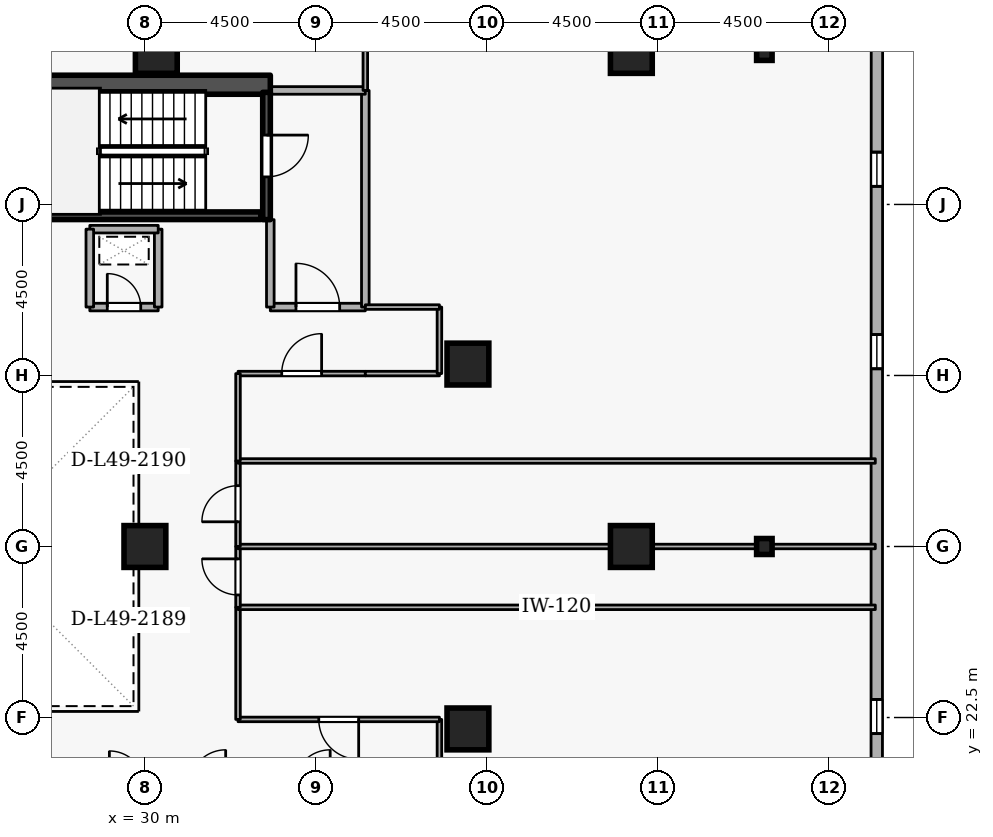
"""IFC4 building model, lengths in metres.
Left out: names, types, materials, properties, quantities, classifications, styles, units other than length and angle.
Written with IfcOpenShell. Run it as: python <this file> out.ifc"""

import sys

from ifc_helpers import new_model, si_unit, direction, frame, frame_2d, origin, origin_2d, place, context, subcontext, project, spatial, rectangle, i_section, extrude, element, fill, save


model = new_model("IFC4")
c1 = context("Model", 3, precision=1e-05, world=origin(), true_north=direction((0.0, 1.0)))
c2 = subcontext(c1, "Body", "Model", "MODEL_VIEW")
j1 = project(units=[si_unit("LENGTHUNIT", "METRE"), si_unit("PLANEANGLEUNIT", "RADIAN")], contexts=[c1])
p1 = place(None, origin())
s1 = spatial("IfcSite", under=j1, at=p1, CompositionType="ELEMENT")
p2 = place(p1, origin())
s2 = spatial("IfcBuilding", under=s1, at=p2, CompositionType="ELEMENT")
p3 = place(p2, frame((0.0, 0.0, 185.7)))
s3 = spatial("IfcBuildingStorey", under=s2, at=p3, CompositionType="ELEMENT", Elevation=185.7)
p4 = place(p3, frame((17.7, 39.15, 0.0), z_axis=(0.0, 0.0, 1.0), x_axis=(1.0, 0.0, 0.0)))
e1 = element("IfcWall", 1, at=p4, inside=s3, PredefinedType="SHEAR", context=c2, shape_type="SweptSolid", body=[
    extrude(rectangle(XDim=15.6, YDim=0.5, at=frame_2d((7.8, 0.0))), origin(), (0.0, 0.0, 1.0), 3.6),
])
for number, where, z_axis, x_axis in (
    (2, (42.8, 27.0, 0.0), (0.0, 0.0, 1.0), (1.0, 0.0, 0.0)),
    (3, (42.8, 40.0, 0.0), (0.0, 0.0, 1.0), (1.0, 0.0, 0.0)),
    (4, (38.5, 22.2, 0.0), (0.0, 0.0, 1.0), (1.0, 0.0, 0.0)),
    (5, (38.5, 31.8, 0.0), (0.0, 0.0, 1.0), (1.0, 0.0, 0.0)),
    (6, (30.3, 40.0, 0.0), (0.0, 0.0, 1.0), (1.0, 0.0, 0.0)),
    (7, (30.0, 27.0, 0.0), (0.0, 0.0, 1.0), (1.0, 0.0, 0.0)),
):
    element("IfcColumn", number, at=place(p3, frame(where, z_axis=z_axis, x_axis=x_axis)), inside=s3, PredefinedType="COLUMN", context=c2, shape_type="SweptSolid", body=[
        extrude(rectangle(XDim=1.1, YDim=1.1, at=origin_2d()), origin(), (0.0, 0.0, 1.0), 3.6),
    ])
for number, where, z_axis, x_axis in (
    (8, (46.3, 27.0, 0.0), (0.0, 0.0, 1.0), (1.0, 0.0, 0.0)),
    (9, (46.3, 40.0, 0.0), (0.0, 0.0, 1.0), (1.0, 0.0, 0.0)),
):
    element("IfcColumn", number, at=place(p3, frame(where, z_axis=z_axis, x_axis=x_axis)), inside=s3, PredefinedType="COLUMN", context=c2, shape_type="SweptSolid", body=[
        extrude(i_section(OverallWidth=0.407, OverallDepth=0.419, WebThickness=0.031, FlangeThickness=0.049, FilletRadius=0.015, at=origin_2d()), origin(), (0.0, 0.0, 1.0), 3.6),
    ])
p5 = place(p3, frame((49.256, 14.576, 0.0), z_axis=(0.0, 0.0, 1.0), x_axis=(0.000268805477, 0.999999963872, 0.0)))
e10 = element("IfcWall", 10, at=p5, inside=s3, PredefinedType="STANDARD", context=c2, shape_type="SweptSolid", body=[
    extrude(rectangle(XDim=33.605, YDim=0.3, at=frame_2d((16.802, 0.0))), origin(), (0.0, 0.0, 1.0), 2.7),
])
p6 = place(p5, frame((2.7, 0.0, 0.72)))
e11 = element("IfcOpeningElement", 11, at=p6, cuts=e10, PredefinedType="OPENING", context=c2, shape_type="SweptSolid", body=[
    extrude(rectangle(XDim=0.9, YDim=1.75, at=frame_2d((0.45, 0.875))), frame((0.0, 0.16, 0.0), z_axis=(0.0, -1.0, 0.0), x_axis=(1.0, 0.0, 0.0)), (0.0, 0.0, 1.0), 0.32),
])
p7 = place(p5, frame((7.5, 0.0, 0.72)))
e12 = element("IfcOpeningElement", 12, at=p7, cuts=e10, PredefinedType="OPENING", context=c2, shape_type="SweptSolid", body=[
    extrude(rectangle(XDim=0.9, YDim=1.75, at=frame_2d((0.45, 0.875))), frame((0.0, 0.16, 0.0), z_axis=(0.0, -1.0, 0.0), x_axis=(1.0, 0.0, 0.0)), (0.0, 0.0, 1.0), 0.32),
])
p8 = place(p5, frame((17.1, 0.0, 0.72)))
e13 = element("IfcOpeningElement", 13, at=p8, cuts=e10, PredefinedType="OPENING", context=c2, shape_type="SweptSolid", body=[
    extrude(rectangle(XDim=0.9, YDim=1.75, at=frame_2d((0.45, 0.875))), frame((0.0, 0.16, 0.0), z_axis=(0.0, -1.0, 0.0), x_axis=(1.0, 0.0, 0.0)), (0.0, 0.0, 1.0), 0.32),
])
p9 = place(p5, frame((21.9, 0.0, 0.72)))
e14 = element("IfcOpeningElement", 14, at=p9, cuts=e10, PredefinedType="OPENING", context=c2, shape_type="SweptSolid", body=[
    extrude(rectangle(XDim=0.9, YDim=1.75, at=frame_2d((0.45, 0.875))), frame((0.0, 0.16, 0.0), z_axis=(0.0, -1.0, 0.0), x_axis=(1.0, 0.0, 0.0)), (0.0, 0.0, 1.0), 0.32),
])
p10 = place(p5, frame((26.7, 0.0, 0.72)))
e15 = element("IfcOpeningElement", 15, at=p10, cuts=e10, PredefinedType="OPENING", context=c2, shape_type="SweptSolid", body=[
    extrude(rectangle(XDim=0.9, YDim=1.75, at=frame_2d((0.45, 0.875))), frame((0.0, 0.16, 0.0), z_axis=(0.0, -1.0, 0.0), x_axis=(1.0, 0.0, 0.0)), (0.0, 0.0, 1.0), 0.32),
])
p11 = place(p3, frame((33.2, 38.95, 0.0), z_axis=(0.0, 0.0, 1.0), x_axis=(0.0, -1.0, 0.0)))
e16 = element("IfcWall", 16, at=p11, inside=s3, PredefinedType="SHEAR", context=c2, shape_type="SweptSolid", body=[
    extrude(rectangle(XDim=3.35, YDim=0.2, at=frame_2d((1.675, 0.0))), origin(), (0.0, 0.0, 1.0), 3.6),
])
p12 = place(p11, frame((1.125, 0.0, 0.0)))
e17 = element("IfcOpeningElement", 17, at=p12, cuts=e16, PredefinedType="OPENING", context=c2, shape_type="SweptSolid", body=[
    extrude(rectangle(XDim=1.1, YDim=2.1, at=frame_2d((0.55, 1.05))), frame((0.0, 0.11, 0.0), z_axis=(0.0, -1.0, 0.0), x_axis=(1.0, 0.0, 0.0)), (0.0, 0.0, 1.0), 0.22),
])
p13 = place(p3, frame((25.95, 35.703, 0.0), z_axis=(0.0, 0.0, 1.0), x_axis=(1.0, 0.0, 0.0)))
e18 = element("IfcWall", 18, at=p13, inside=s3, PredefinedType="SHEAR", context=c2, shape_type="SweptSolid", body=[
    extrude(rectangle(XDim=7.1, YDim=0.2, at=frame_2d((3.55, 0.0))), origin(), (0.0, 0.0, 1.0), 3.6),
])
p14 = place(p3, frame((33.3, 33.3, 0.0), z_axis=(0.0, 0.0, 1.0), x_axis=(1.0, 0.0, 0.0)))
e19 = element("IfcWall", 19, at=p14, inside=s3, PredefinedType="STANDARD", context=c2, shape_type="SweptSolid", body=[
    extrude(rectangle(XDim=2.5, YDim=0.2, at=frame_2d((1.25, 0.0))), origin(), (0.0, 0.0, 1.0), 3.34),
])
p15 = place(p14, frame((0.675, 0.0, 0.0)))
e20 = element("IfcOpeningElement", 20, at=p15, cuts=e19, PredefinedType="OPENING", context=c2, shape_type="SweptSolid", body=[
    extrude(rectangle(XDim=1.15, YDim=2.1, at=frame_2d((0.575, 1.05))), frame((0.0, 0.11, 0.0), z_axis=(0.0, -1.0, 0.0), x_axis=(1.0, 0.0, 0.0)), (0.0, 0.0, 1.0), 0.22),
])
p16 = place(p3, frame((35.8, 33.3, 0.0), z_axis=(0.0, 0.0, 1.0), x_axis=(0.0, 1.0, 0.0)))
e21 = element("IfcWall", 21, at=p16, inside=s3, PredefinedType="STANDARD", context=c2, shape_type="SweptSolid", body=[
    extrude(rectangle(XDim=5.7, YDim=0.2, at=frame_2d((2.85, 0.0))), origin(), (0.0, 0.0, 1.0), 3.34),
])
p17 = place(p3, frame((35.8, 39.0, 0.0), z_axis=(0.0, 0.0, 1.0), x_axis=(-1.0, 0.0, 0.0)))
e22 = element("IfcWall", 22, at=p17, inside=s3, PredefinedType="STANDARD", context=c2, shape_type="SweptSolid", body=[
    extrude(rectangle(XDim=2.5, YDim=0.2, at=frame_2d((1.25, 0.0))), origin(), (0.0, 0.0, 1.0), 3.34),
])
p18 = place(p3, frame((33.3, 35.6, 0.0), z_axis=(0.0, 0.0, 1.0), x_axis=(0.0, -1.0, 0.0)))
e23 = element("IfcWall", 23, at=p18, inside=s3, PredefinedType="STANDARD", context=c2, shape_type="SweptSolid", body=[
    extrude(rectangle(XDim=2.3, YDim=0.2, at=frame_2d((1.15, 0.0))), origin(), (0.0, 0.0, 1.0), 2.545),
])
p19 = place(p3, frame((28.55, 33.3, 0.0), z_axis=(0.0, 0.0, 1.0), x_axis=(1.0, 0.0, 0.0)))
e24 = element("IfcWall", 24, at=p19, inside=s3, PredefinedType="STANDARD", context=c2, shape_type="SweptSolid", body=[
    extrude(rectangle(XDim=1.8, YDim=0.2, at=frame_2d((0.9, 0.0))), origin(), (0.0, 0.0, 1.0), 3.34),
])
p20 = place(p19, frame((0.46, 0.0, 0.0)))
e25 = element("IfcOpeningElement", 25, at=p20, cuts=e24, PredefinedType="OPENING", context=c2, shape_type="SweptSolid", body=[
    extrude(rectangle(XDim=0.88, YDim=2.04, at=frame_2d((0.44, 1.02))), frame((0.0, 0.11, 0.0), z_axis=(0.0, -1.0, 0.0), x_axis=(1.0, 0.0, 0.0)), (0.0, 0.0, 1.0), 0.22),
])
p21 = place(p3, frame((30.35, 33.3, 0.0), z_axis=(0.0, 0.0, 1.0), x_axis=(0.0, 1.0, 0.0)))
e26 = element("IfcWall", 26, at=p21, inside=s3, PredefinedType="STANDARD", context=c2, shape_type="SweptSolid", body=[
    extrude(rectangle(XDim=2.05, YDim=0.2, at=frame_2d((1.025, 0.0))), origin(), (0.0, 0.0, 1.0), 3.34),
])
p22 = place(p3, frame((30.35, 35.35, 0.0), z_axis=(0.0, 0.0, 1.0), x_axis=(-1.0, 0.0, 0.0)))
e27 = element("IfcWall", 27, at=p22, inside=s3, PredefinedType="STANDARD", context=c2, shape_type="SweptSolid", body=[
    extrude(rectangle(XDim=1.8, YDim=0.2, at=frame_2d((0.9, 0.0))), origin(), (0.0, 0.0, 1.0), 3.34),
])
p23 = place(p3, frame((28.55, 35.35, 0.0), z_axis=(0.0, 0.0, 1.0), x_axis=(0.0, -1.0, 0.0)))
e28 = element("IfcWall", 28, at=p23, inside=s3, PredefinedType="STANDARD", context=c2, shape_type="SweptSolid", body=[
    extrude(rectangle(XDim=2.05, YDim=0.2, at=frame_2d((1.025, 0.0))), origin(), (0.0, 0.0, 1.0), 3.34),
])
p24 = place(p3, frame((37.75, 20.7, 0.0), z_axis=(0.0, 0.0, 1.0), x_axis=(0.0, 1.0, 0.0)))
e29 = element("IfcWall", 29, at=p24, inside=s3, PredefinedType="PARTITIONING", context=c2, shape_type="SweptSolid", body=[
    extrude(rectangle(XDim=1.75, YDim=0.12, at=frame_2d((0.875, 0.0))), origin(), (0.0, 0.0, 1.0), 3.34),
])
p25 = place(p3, frame((37.75, 22.45, 0.0), z_axis=(0.0, 0.0, 1.0), x_axis=(-1.0, 0.0, 0.0)))
e30 = element("IfcWall", 30, at=p25, inside=s3, PredefinedType="PARTITIONING", context=c2, shape_type="SweptSolid", body=[
    extrude(rectangle(XDim=5.3, YDim=0.12, at=frame_2d((2.65, 0.0))), origin(), (0.0, 0.0, 1.0), 3.34),
])
p26 = place(p25, frame((2.125, 0.0, 0.0)))
e31 = element("IfcOpeningElement", 31, at=p26, cuts=e30, PredefinedType="OPENING", context=c2, shape_type="SweptSolid", body=[
    extrude(rectangle(XDim=1.05, YDim=2.1, at=frame_2d((0.525, 1.05))), frame((0.0, 0.07, 0.0), z_axis=(0.0, -1.0, 0.0), x_axis=(1.0, 0.0, 0.0)), (0.0, 0.0, 1.0), 0.14),
])
p27 = place(p3, frame((32.45, 22.45, 0.0), z_axis=(0.0, 0.0, 1.0), x_axis=(0.0, 1.0, 0.0)))
e32 = element("IfcWall", 32, at=p27, inside=s3, PredefinedType="PARTITIONING", context=c2, shape_type="SweptSolid", body=[
    extrude(rectangle(XDim=2.95, YDim=0.12, at=frame_2d((1.475, 0.0))), origin(), (0.0, 0.0, 1.0), 3.34),
])
p28 = place(p3, frame((32.45, 25.4, 0.0), z_axis=(0.0, 0.0, 1.0), x_axis=(1.0, 0.0, 0.0)))
e33 = element("IfcWall", 33, at=p28, inside=s3, PredefinedType="PARTITIONING", context=c2, shape_type="SweptSolid", body=[
    extrude(rectangle(XDim=16.77, YDim=0.12, at=frame_2d((8.385, 0.0))), origin(), (0.0, 0.0, 1.0), 3.34),
])
p29 = place(p3, frame((32.45, 25.4, 0.0), z_axis=(0.0, 0.0, 1.0), x_axis=(0.0, 1.0, 0.0)))
e34 = element("IfcWall", 34, at=p29, inside=s3, PredefinedType="PARTITIONING", context=c2, shape_type="SweptSolid", body=[
    extrude(rectangle(XDim=1.6, YDim=0.12, at=frame_2d((0.8, 0.0))), origin(), (0.0, 0.0, 1.0), 3.34),
])
p30 = place(p29, frame((0.325, 0.0, 0.0)))
e35 = element("IfcOpeningElement", 35, at=p30, cuts=e34, PredefinedType="OPENING", context=c2, shape_type="SweptSolid", body=[
    extrude(rectangle(XDim=0.95, YDim=2.1, at=frame_2d((0.475, 1.05))), frame((0.0, 0.07, 0.0), z_axis=(0.0, -1.0, 0.0), x_axis=(1.0, 0.0, 0.0)), (0.0, 0.0, 1.0), 0.14),
])
p31 = place(p3, frame((32.45, 27.0, 0.0), z_axis=(0.0, 0.0, 1.0), x_axis=(1.0, 0.0, 0.0)))
e36 = element("IfcWall", 36, at=p31, inside=s3, PredefinedType="PARTITIONING", context=c2, shape_type="SweptSolid", body=[
    extrude(rectangle(XDim=16.77, YDim=0.12, at=frame_2d((8.385, 0.0))), origin(), (0.0, 0.0, 1.0), 2.878),
])
p32 = place(p3, frame((32.45, 27.0, 0.0), z_axis=(0.0, 0.0, 1.0), x_axis=(0.0, 1.0, 0.0)))
e37 = element("IfcWall", 37, at=p32, inside=s3, PredefinedType="PARTITIONING", context=c2, shape_type="SweptSolid", body=[
    extrude(rectangle(XDim=2.25, YDim=0.12, at=frame_2d((1.125, 0.0))), origin(), (0.0, 0.0, 1.0), 3.34),
])
p33 = place(p32, frame((0.65, 0.0, 0.0)))
e38 = element("IfcOpeningElement", 38, at=p33, cuts=e37, PredefinedType="OPENING", context=c2, shape_type="SweptSolid", body=[
    extrude(rectangle(XDim=0.95, YDim=2.1, at=frame_2d((0.475, 1.05))), frame((0.0, 0.07, 0.0), z_axis=(0.0, -1.0, 0.0), x_axis=(1.0, 0.0, 0.0)), (0.0, 0.0, 1.0), 0.14),
])
p34 = place(p3, frame((32.45, 29.25, 0.0), z_axis=(0.0, 0.0, 1.0), x_axis=(1.0, 0.0, 0.0)))
e39 = element("IfcWall", 39, at=p34, inside=s3, PredefinedType="PARTITIONING", context=c2, shape_type="SweptSolid", body=[
    extrude(rectangle(XDim=16.77, YDim=0.12, at=frame_2d((8.385, 0.0))), origin(), (0.0, 0.0, 1.0), 3.34),
])
p35 = place(p3, frame((32.45, 31.55, 0.0), z_axis=(0.0, 0.0, 1.0), x_axis=(1.0, 0.0, 0.0)))
e40 = element("IfcWall", 40, at=p35, inside=s3, PredefinedType="PARTITIONING", context=c2, shape_type="SweptSolid", body=[
    extrude(rectangle(XDim=3.35, YDim=0.12, at=frame_2d((1.675, 0.0))), origin(), (0.0, 0.0, 1.0), 3.34),
])
p36 = place(p35, frame((1.15, 0.0, 0.0)))
e41 = element("IfcOpeningElement", 41, at=p36, cuts=e40, PredefinedType="OPENING", context=c2, shape_type="SweptSolid", body=[
    extrude(rectangle(XDim=1.05, YDim=2.1, at=frame_2d((0.525, 1.05))), frame((0.0, 0.07, 0.0), z_axis=(0.0, -1.0, 0.0), x_axis=(1.0, 0.0, 0.0)), (0.0, 0.0, 1.0), 0.14),
])
p37 = place(p3, frame((35.8, 31.55, 0.0), z_axis=(0.0, 0.0, 1.0), x_axis=(1.0, 0.0, 0.0)))
e42 = element("IfcWall", 42, at=p37, inside=s3, PredefinedType="PARTITIONING", context=c2, shape_type="SweptSolid", body=[
    extrude(rectangle(XDim=1.95, YDim=0.12, at=frame_2d((0.975, 0.0))), origin(), (0.0, 0.0, 1.0), 3.34),
])
p38 = place(p3, frame((37.75, 31.55, 0.0), z_axis=(0.0, 0.0, 1.0), x_axis=(0.0, 1.0, 0.0)))
e43 = element("IfcWall", 43, at=p38, inside=s3, PredefinedType="PARTITIONING", context=c2, shape_type="SweptSolid", body=[
    extrude(rectangle(XDim=1.75, YDim=0.12, at=frame_2d((0.875, 0.0))), origin(), (0.0, 0.0, 1.0), 3.34),
])
p39 = place(p3, frame((37.75, 33.3, 0.0), z_axis=(0.0, 0.0, 1.0), x_axis=(-1.0, 0.0, 0.0)))
e44 = element("IfcWall", 44, at=p39, inside=s3, PredefinedType="PARTITIONING", context=c2, shape_type="SweptSolid", body=[
    extrude(rectangle(XDim=1.95, YDim=0.12, at=frame_2d((0.975, 0.0))), origin(), (0.0, 0.0, 1.0), 3.34),
])
p40 = place(p3, frame((35.8, 39.0, 0.0), z_axis=(0.0, 0.0, 1.0), x_axis=(0.0, 1.0, 0.0)))
e45 = element("IfcWall", 45, at=p40, inside=s3, PredefinedType="PARTITIONING", context=c2, shape_type="SweptSolid", body=[
    extrude(rectangle(XDim=11.72, YDim=0.12, at=frame_2d((5.86, 0.0))), origin(), (0.0, 0.0, 1.0), 3.34),
])
p41 = place(p3, frame((32.45, 29.25, 0.0), z_axis=(0.0, 0.0, 1.0), x_axis=(0.0, 1.0, 0.0)))
e46 = element("IfcWall", 46, at=p41, inside=s3, PredefinedType="PARTITIONING", context=c2, shape_type="SweptSolid", body=[
    extrude(rectangle(XDim=2.3, YDim=0.12, at=frame_2d((1.15, 0.0))), origin(), (0.0, 0.0, 1.0), 3.34),
])
p42 = place(p7, origin())
e47 = element("IfcWindow", 47, at=p42, inside=s3, PartitioningType="SINGLE_PANEL", PredefinedType="WINDOW", context=c2, shape_type="SweptSolid", body=[
    extrude(rectangle(XDim=0.9, YDim=1.75, at=frame_2d((0.45, 0.875))), frame((0.0, 0.03, 0.0), z_axis=(0.0, -1.0, 0.0), x_axis=(1.0, 0.0, 0.0)), (0.0, 0.0, 1.0), 0.06),
])
fill(e12, e47)
p43 = place(p8, origin())
e48 = element("IfcWindow", 48, at=p43, inside=s3, PartitioningType="SINGLE_PANEL", PredefinedType="WINDOW", context=c2, shape_type="SweptSolid", body=[
    extrude(rectangle(XDim=0.9, YDim=1.75, at=frame_2d((0.45, 0.875))), frame((0.0, 0.03, 0.0), z_axis=(0.0, -1.0, 0.0), x_axis=(1.0, 0.0, 0.0)), (0.0, 0.0, 1.0), 0.06),
])
fill(e13, e48)
p44 = place(p9, origin())
e49 = element("IfcWindow", 49, at=p44, inside=s3, PartitioningType="SINGLE_PANEL", PredefinedType="WINDOW", context=c2, shape_type="SweptSolid", body=[
    extrude(rectangle(XDim=0.9, YDim=1.75, at=frame_2d((0.45, 0.875))), frame((0.0, 0.03, 0.0), z_axis=(0.0, -1.0, 0.0), x_axis=(1.0, 0.0, 0.0)), (0.0, 0.0, 1.0), 0.06),
])
fill(e14, e49)
p45 = place(p12, origin())
e50 = element("IfcDoor", 50, at=p45, inside=s3, OperationType="SINGLE_SWING_LEFT", PredefinedType="DOOR", context=c2, shape_type="SweptSolid", body=[
    extrude(rectangle(XDim=1.1, YDim=2.1, at=frame_2d((0.55, 1.05))), frame((0.0, 0.025, 0.0), z_axis=(0.0, -1.0, 0.0), x_axis=(1.0, 0.0, 0.0)), (0.0, 0.0, 1.0), 0.05),
])
fill(e17, e50)
p46 = place(p15, origin())
e51 = element("IfcDoor", 51, at=p46, inside=s3, OperationType="SINGLE_SWING_LEFT", PredefinedType="DOOR", context=c2, shape_type="SweptSolid", body=[
    extrude(rectangle(XDim=1.15, YDim=2.1, at=frame_2d((0.575, 1.05))), frame((0.0, 0.025, 0.0), z_axis=(0.0, -1.0, 0.0), x_axis=(1.0, 0.0, 0.0)), (0.0, 0.0, 1.0), 0.05),
])
fill(e20, e51)
p47 = place(p20, origin())
e52 = element("IfcDoor", 52, at=p47, inside=s3, OperationType="SINGLE_SWING_LEFT", PredefinedType="DOOR", context=c2, shape_type="SweptSolid", body=[
    extrude(rectangle(XDim=0.88, YDim=2.04, at=frame_2d((0.44, 1.02))), frame((0.0, 0.025, 0.0), z_axis=(0.0, -1.0, 0.0), x_axis=(1.0, 0.0, 0.0)), (0.0, 0.0, 1.0), 0.05),
])
fill(e25, e52)
p48 = place(p26, origin())
e53 = element("IfcDoor", 53, at=p48, inside=s3, OperationType="SINGLE_SWING_LEFT", PredefinedType="DOOR", context=c2, shape_type="SweptSolid", body=[
    extrude(rectangle(XDim=1.05, YDim=2.1, at=frame_2d((0.525, 1.05))), frame((0.0, 0.025, 0.0), z_axis=(0.0, -1.0, 0.0), x_axis=(1.0, 0.0, 0.0)), (0.0, 0.0, 1.0), 0.05),
])
fill(e31, e53)
p49 = place(p30, origin())
e54 = element("IfcDoor", 54, at=p49, inside=s3, OperationType="SINGLE_SWING_RIGHT", PredefinedType="DOOR", context=c2, shape_type="SweptSolid", body=[
    extrude(rectangle(XDim=0.95, YDim=2.1, at=frame_2d((0.475, 1.05))), frame((0.0, 0.025, 0.0), z_axis=(0.0, -1.0, 0.0), x_axis=(1.0, 0.0, 0.0)), (0.0, 0.0, 1.0), 0.05),
])
fill(e35, e54)
p50 = place(p33, origin())
e55 = element("IfcDoor", 55, at=p50, inside=s3, OperationType="SINGLE_SWING_LEFT", PredefinedType="DOOR", context=c2, shape_type="SweptSolid", body=[
    extrude(rectangle(XDim=0.95, YDim=2.1, at=frame_2d((0.475, 1.05))), frame((0.0, 0.025, 0.0), z_axis=(0.0, -1.0, 0.0), x_axis=(1.0, 0.0, 0.0)), (0.0, 0.0, 1.0), 0.05),
])
fill(e38, e55)
p51 = place(p36, origin())
e56 = element("IfcDoor", 56, at=p51, inside=s3, OperationType="SINGLE_SWING_RIGHT", PredefinedType="DOOR", context=c2, shape_type="SweptSolid", body=[
    extrude(rectangle(XDim=1.05, YDim=2.1, at=frame_2d((0.525, 1.05))), frame((0.0, 0.025, 0.0), z_axis=(0.0, -1.0, 0.0), x_axis=(1.0, 0.0, 0.0)), (0.0, 0.0, 1.0), 0.05),
])
fill(e41, e56)
save(model, sys.argv[1])
